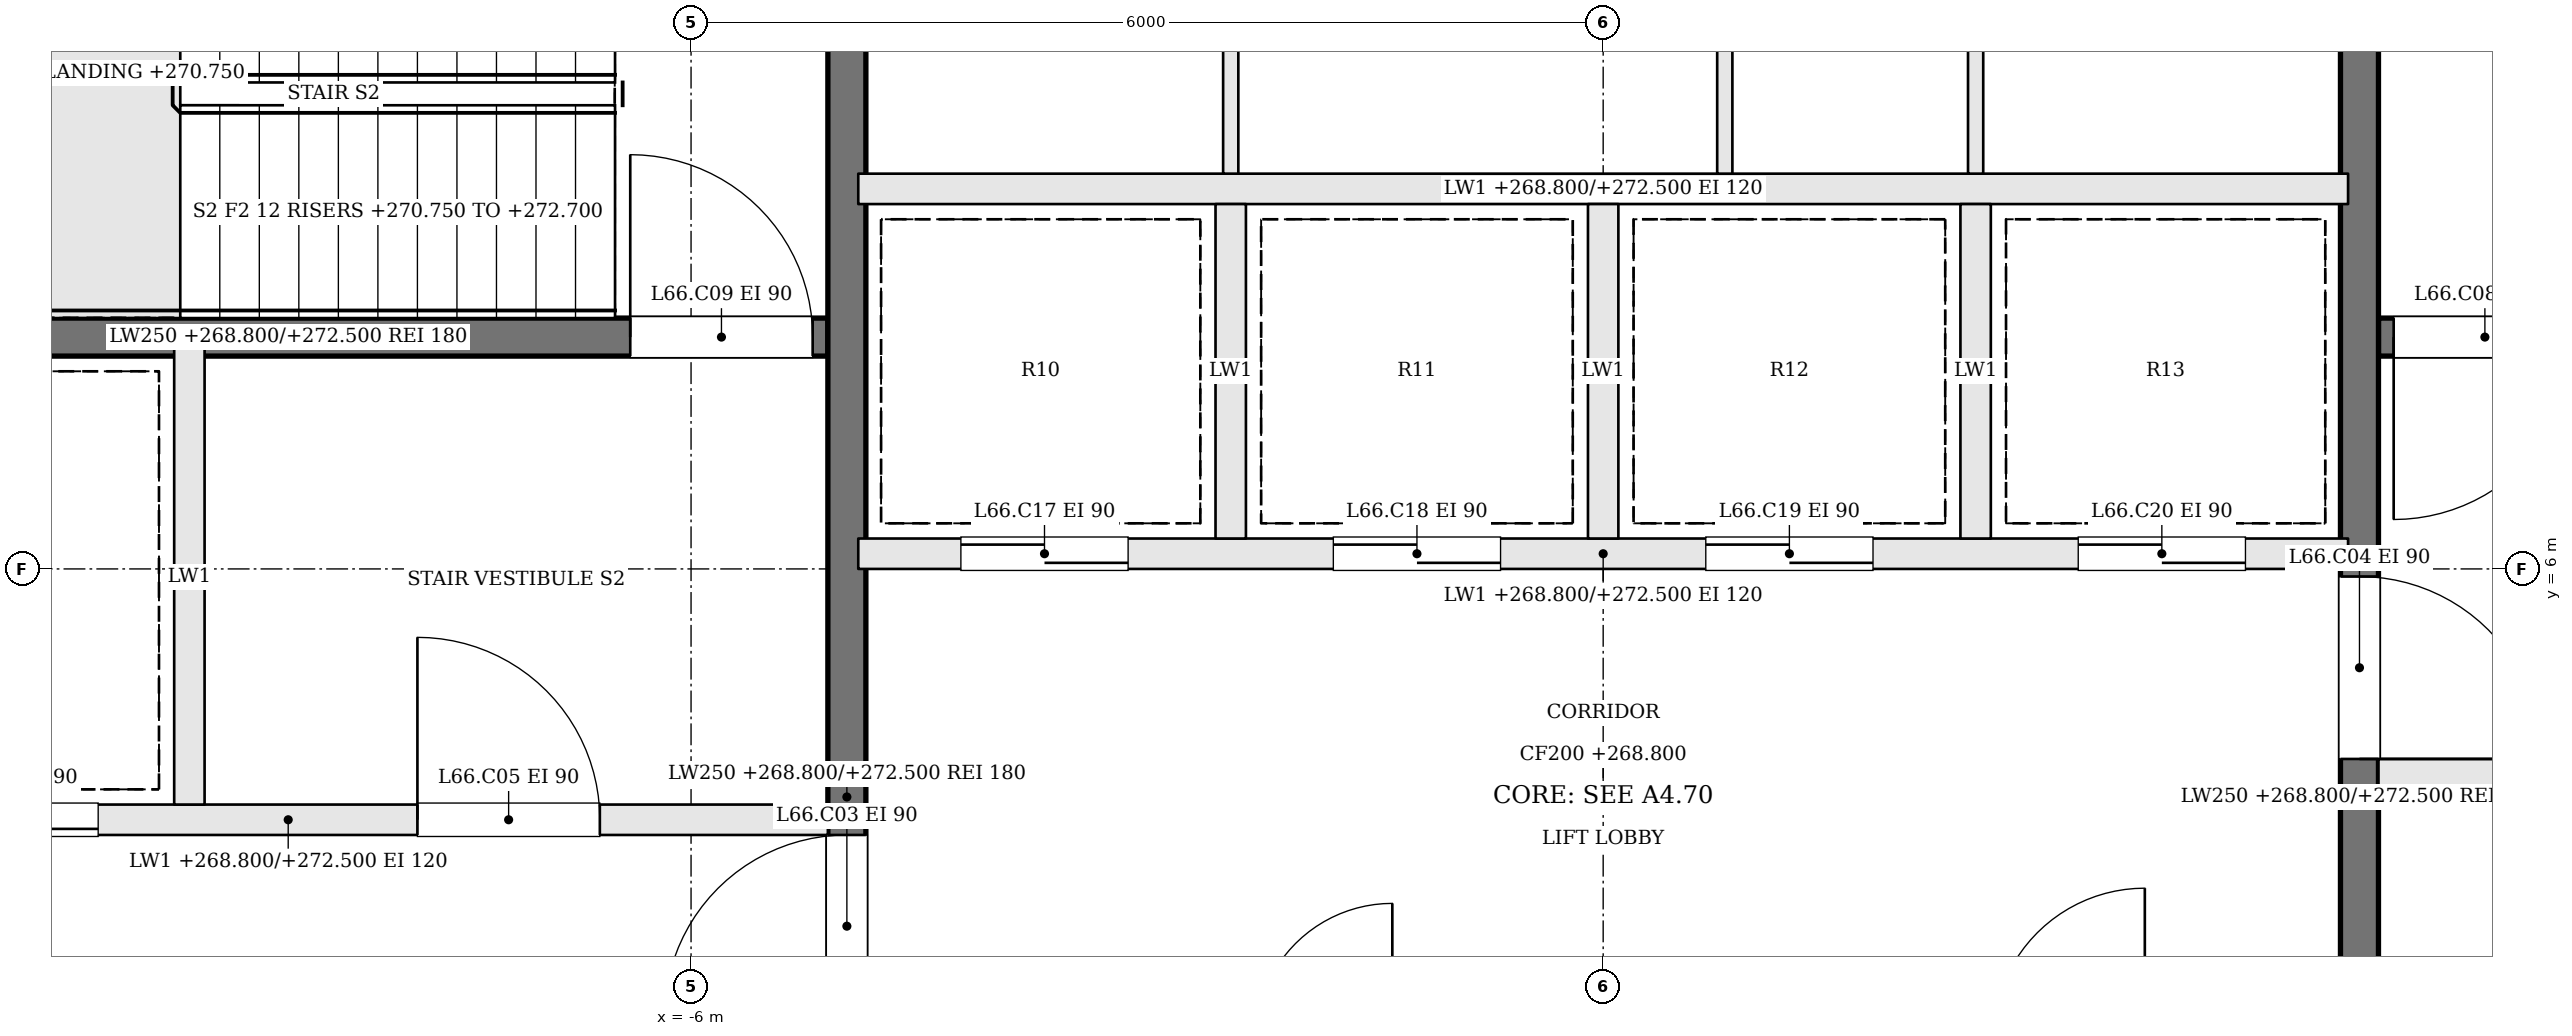
"""IFC4 building model, lengths in metres.
Left out: names, types, materials, properties, quantities, classifications, styles, units other than length and angle.
Written with IfcOpenShell. Run it as: python <this file> out.ifc"""

import sys

from ifc_helpers import new_model, si_unit, direction, frame, frame_2d, origin, place, context, subcontext, project, spatial, rectangle, extrude, element, fill, save


model = new_model("IFC4")
c1 = context("Model", 3, precision=1e-05, world=origin(), true_north=direction((0.0, 1.0)))
c2 = subcontext(c1, "Body", "Model", "MODEL_VIEW")
j1 = project(units=[si_unit("LENGTHUNIT", "METRE"), si_unit("PLANEANGLEUNIT", "RADIAN")], contexts=[c1])
p1 = place(None, origin())
s1 = spatial("IfcSite", under=j1, at=p1, CompositionType="ELEMENT")
p2 = place(p1, origin())
s2 = spatial("IfcBuilding", under=s1, at=p2, CompositionType="ELEMENT")
p3 = place(p2, frame((0.0, 0.0, 268.8)))
s3 = spatial("IfcBuildingStorey", under=s2, at=p3, CompositionType="ELEMENT", Elevation=268.8)
p4 = place(p3, frame((12.2, 7.525, 0.0), z_axis=(0.0, 0.0, 1.0), x_axis=(-1.0, 0.0, 0.0)))
e1 = element("IfcWall", 1, at=p4, inside=s3, PredefinedType="SOLIDWALL", context=c2, shape_type="SweptSolid", body=[
    extrude(rectangle(XDim=7.1, YDim=0.25, at=frame_2d((3.55, 0.0))), origin(), (0.0, 0.0, 1.0), 3.7),
])
p5 = place(p4, frame((5.8, 0.0, 0.0)))
e2 = element("IfcOpeningElement", 2, at=p5, cuts=e1, PredefinedType="OPENING", context=c2, shape_type="SweptSolid", body=[
    extrude(rectangle(XDim=1.2, YDim=2.1, at=frame_2d((0.6, 1.05))), frame((0.0, 0.135, 0.0), z_axis=(0.0, -1.0, 0.0), x_axis=(1.0, 0.0, 0.0)), (0.0, 0.0, 1.0), 0.27),
])
p6 = place(p3, frame((-12.2, 4.35, 0.0), z_axis=(0.0, 0.0, 1.0), x_axis=(1.0, 0.0, 0.0)))
e3 = element("IfcWall", 3, at=p6, inside=s3, PredefinedType="SOLIDWALL", context=c2, shape_type="SweptSolid", body=[
    extrude(rectangle(XDim=7.1, YDim=0.2, at=frame_2d((3.55, 0.0))), origin(), (0.0, 0.0, 1.0), 3.7),
])
p7 = place(p6, frame((4.4, 0.0, 0.0)))
e4 = element("IfcOpeningElement", 4, at=p7, cuts=e3, PredefinedType="OPENING", context=c2, shape_type="SweptSolid", body=[
    extrude(rectangle(XDim=1.2, YDim=2.1, at=frame_2d((0.6, 1.05))), frame((0.0, 0.11, 0.0), z_axis=(0.0, -1.0, 0.0), x_axis=(1.0, 0.0, 0.0)), (0.0, 0.0, 1.0), 0.22),
])
p8 = place(p6, frame((1.1, 0.0, 0.0)))
e5 = element("IfcOpeningElement", 5, at=p8, cuts=e3, PredefinedType="OPENING", context=c2, shape_type="SweptSolid", body=[
    extrude(rectangle(XDim=1.2, YDim=2.1, at=frame_2d((0.6, 1.05))), frame((0.0, 0.11, 0.0), z_axis=(0.0, -1.0, 0.0), x_axis=(1.0, 0.0, 0.0)), (0.0, 0.0, 1.0), 0.22),
])
p9 = place(p3, frame((12.2, 4.65, 0.0), z_axis=(0.0, 0.0, 1.0), x_axis=(-1.0, 0.0, 0.0)))
e6 = element("IfcWall", 6, at=p9, inside=s3, PredefinedType="SOLIDWALL", context=c2, shape_type="SweptSolid", body=[
    extrude(rectangle(XDim=7.1, YDim=0.2, at=frame_2d((3.55, 0.0))), origin(), (0.0, 0.0, 1.0), 3.7),
])
p10 = place(p9, frame((4.4, 0.0, 0.0)))
e7 = element("IfcOpeningElement", 7, at=p10, cuts=e6, PredefinedType="OPENING", context=c2, shape_type="SweptSolid", body=[
    extrude(rectangle(XDim=1.2, YDim=2.1, at=frame_2d((0.6, 1.05))), frame((0.0, 0.11, 0.0), z_axis=(0.0, -1.0, 0.0), x_axis=(1.0, 0.0, 0.0)), (0.0, 0.0, 1.0), 0.22),
])
p11 = place(p9, frame((1.1, 0.0, 0.0)))
e8 = element("IfcOpeningElement", 8, at=p11, cuts=e6, PredefinedType="OPENING", context=c2, shape_type="SweptSolid", body=[
    extrude(rectangle(XDim=1.2, YDim=2.1, at=frame_2d((0.6, 1.05))), frame((0.0, 0.11, 0.0), z_axis=(0.0, -1.0, 0.0), x_axis=(1.0, 0.0, 0.0)), (0.0, 0.0, 1.0), 0.22),
])
p12 = place(p3, frame((-12.2, 7.525, 0.0), z_axis=(0.0, 0.0, 1.0), x_axis=(1.0, 0.0, 0.0)))
e9 = element("IfcWall", 9, at=p12, inside=s3, PredefinedType="SOLIDWALL", context=c2, shape_type="SweptSolid", body=[
    extrude(rectangle(XDim=7.1, YDim=0.25, at=frame_2d((3.55, 0.0))), origin(), (0.0, 0.0, 1.0), 3.7),
])
p13 = place(p12, frame((5.8, 0.0, 0.0)))
e10 = element("IfcOpeningElement", 10, at=p13, cuts=e9, PredefinedType="OPENING", context=c2, shape_type="SweptSolid", body=[
    extrude(rectangle(XDim=1.2, YDim=2.1, at=frame_2d((0.6, 1.05))), frame((0.0, 0.135, 0.0), z_axis=(0.0, -1.0, 0.0), x_axis=(1.0, 0.0, 0.0)), (0.0, 0.0, 1.0), 0.27),
])
p14 = place(p3, frame((-9.3, 4.45, 0.0), z_axis=(0.0, 0.0, 1.0), x_axis=(0.0, 1.0, 0.0)))
e11 = element("IfcWall", 11, at=p14, inside=s3, PredefinedType="SOLIDWALL", context=c2, shape_type="SweptSolid", body=[
    extrude(rectangle(XDim=3.0, YDim=0.2, at=frame_2d((1.5, 0.0))), origin(), (0.0, 0.0, 1.0), 3.7),
])
p15 = place(p3, frame((-4.975, -2.2, 0.0), z_axis=(0.0, 0.0, 1.0), x_axis=(0.0, 1.0, 0.0)))
e12 = element("IfcWall", 12, at=p15, inside=s3, PredefinedType="SOLIDWALL", context=c2, shape_type="SweptSolid", body=[
    extrude(rectangle(XDim=13.4, YDim=0.25, at=frame_2d((6.7, 0.0))), origin(), (0.0, 0.0, 1.0), 3.7),
])
p16 = place(p15, frame((5.25, 0.0, 0.0)))
e13 = element("IfcOpeningElement", 13, at=p16, cuts=e12, PredefinedType="OPENING", context=c2, shape_type="SweptSolid", body=[
    extrude(rectangle(XDim=1.2, YDim=2.1, at=frame_2d((0.6, 1.05))), frame((0.0, 0.135, 0.0), z_axis=(0.0, -1.0, 0.0), x_axis=(1.0, 0.0, 0.0)), (0.0, 0.0, 1.0), 0.27),
])
p17 = place(p3, frame((4.975, 11.2, 0.0), z_axis=(0.0, 0.0, 1.0), x_axis=(0.0, -1.0, 0.0)))
e14 = element("IfcWall", 14, at=p17, inside=s3, PredefinedType="SOLIDWALL", context=c2, shape_type="SweptSolid", body=[
    extrude(rectangle(XDim=13.4, YDim=0.25, at=frame_2d((6.7, 0.0))), origin(), (0.0, 0.0, 1.0), 3.7),
])
p18 = place(p17, frame((5.25, 0.0, 0.0)))
e15 = element("IfcOpeningElement", 15, at=p18, cuts=e14, PredefinedType="OPENING", context=c2, shape_type="SweptSolid", body=[
    extrude(rectangle(XDim=1.2, YDim=2.1, at=frame_2d((0.6, 1.05))), frame((0.0, 0.135, 0.0), z_axis=(0.0, -1.0, 0.0), x_axis=(1.0, 0.0, 0.0)), (0.0, 0.0, 1.0), 0.27),
])
p19 = place(p3, frame((-4.9, 6.1, 0.0), z_axis=(0.0, 0.0, 1.0), x_axis=(1.0, 0.0, 0.0)))
e16 = element("IfcWall", 16, at=p19, inside=s3, PredefinedType="SOLIDWALL", context=c2, shape_type="SweptSolid", body=[
    extrude(rectangle(XDim=9.8, YDim=0.2, at=frame_2d((4.9, 0.0))), origin(), (0.0, 0.0, 1.0), 3.7),
])
p20 = place(p19, frame((0.675, 0.0, 0.0)))
e17 = element("IfcOpeningElement", 17, at=p20, cuts=e16, PredefinedType="OPENING", context=c2, shape_type="SweptSolid", body=[
    extrude(rectangle(XDim=1.1, YDim=2.1, at=frame_2d((0.55, 1.05))), frame((0.0, 0.11, 0.0), z_axis=(0.0, -1.0, 0.0), x_axis=(1.0, 0.0, 0.0)), (0.0, 0.0, 1.0), 0.22),
])
p21 = place(p19, frame((3.125, 0.0, 0.0)))
e18 = element("IfcOpeningElement", 18, at=p21, cuts=e16, PredefinedType="OPENING", context=c2, shape_type="SweptSolid", body=[
    extrude(rectangle(XDim=1.1, YDim=2.1, at=frame_2d((0.55, 1.05))), frame((0.0, 0.11, 0.0), z_axis=(0.0, -1.0, 0.0), x_axis=(1.0, 0.0, 0.0)), (0.0, 0.0, 1.0), 0.22),
])
p22 = place(p19, frame((5.575, 0.0, 0.0)))
e19 = element("IfcOpeningElement", 19, at=p22, cuts=e16, PredefinedType="OPENING", context=c2, shape_type="SweptSolid", body=[
    extrude(rectangle(XDim=1.1, YDim=2.1, at=frame_2d((0.55, 1.05))), frame((0.0, 0.11, 0.0), z_axis=(0.0, -1.0, 0.0), x_axis=(1.0, 0.0, 0.0)), (0.0, 0.0, 1.0), 0.22),
])
p23 = place(p19, frame((8.025, 0.0, 0.0)))
e20 = element("IfcOpeningElement", 20, at=p23, cuts=e16, PredefinedType="OPENING", context=c2, shape_type="SweptSolid", body=[
    extrude(rectangle(XDim=1.1, YDim=2.1, at=frame_2d((0.55, 1.05))), frame((0.0, 0.11, 0.0), z_axis=(0.0, -1.0, 0.0), x_axis=(1.0, 0.0, 0.0)), (0.0, 0.0, 1.0), 0.22),
])
p24 = place(p3, frame((-4.9, 8.5, 0.0), z_axis=(0.0, 0.0, 1.0), x_axis=(1.0, 0.0, 0.0)))
e21 = element("IfcWall", 21, at=p24, inside=s3, PredefinedType="SOLIDWALL", context=c2, shape_type="SweptSolid", body=[
    extrude(rectangle(XDim=9.8, YDim=0.2, at=frame_2d((4.9, 0.0))), origin(), (0.0, 0.0, 1.0), 3.7),
])
for number, where, z_axis, x_axis in (
    (22, (-2.45, 6.2, 0.0), (0.0, 0.0, 1.0), (0.0, 1.0, 0.0)),
    (23, (0.0, 6.2, 0.0), (0.0, 0.0, 1.0), (0.0, 1.0, 0.0)),
    (24, (2.45, 6.2, 0.0), (0.0, 0.0, 1.0), (0.0, 1.0, 0.0)),
):
    element("IfcWall", number, at=place(p3, frame(where, z_axis=z_axis, x_axis=x_axis)), inside=s3, PredefinedType="SOLIDWALL", context=c2, shape_type="SweptSolid", body=[
        extrude(rectangle(XDim=2.2, YDim=0.2, at=frame_2d((1.1, 0.0))), origin(), (0.0, 0.0, 1.0), 3.7),
    ])
for number, where, z_axis, x_axis in (
    (25, (-2.45, 8.6, 0.0), (0.0, 0.0, 1.0), (0.0, 1.0, 0.0)),
    (26, (0.8, 8.6, 0.0), (0.0, 0.0, 1.0), (0.0, 1.0, 0.0)),
    (27, (2.45, 8.6, 0.0), (0.0, 0.0, 1.0), (0.0, 1.0, 0.0)),
):
    element("IfcWall", number, at=place(p3, frame(where, z_axis=z_axis, x_axis=x_axis)), inside=s3, PredefinedType="PARTITIONING", context=c2, shape_type="SweptSolid", body=[
        extrude(rectangle(XDim=2.6, YDim=0.1, at=frame_2d((1.3, 0.0))), origin(), (0.0, 0.0, 1.0), 3.7),
    ])
p25 = place(p16, origin())
e28 = element("IfcDoor", 28, at=p25, inside=s3, OperationType="SINGLE_SWING_LEFT", PredefinedType="DOOR", context=c2, shape_type="SweptSolid", body=[
    extrude(rectangle(XDim=1.2, YDim=2.1, at=frame_2d((0.6, 1.05))), frame((0.0, 0.025, 0.0), z_axis=(0.0, -1.0, 0.0), x_axis=(1.0, 0.0, 0.0)), (0.0, 0.0, 1.0), 0.05),
])
fill(e13, e28)
p26 = place(p18, origin())
e29 = element("IfcDoor", 29, at=p26, inside=s3, OperationType="SINGLE_SWING_RIGHT", PredefinedType="DOOR", context=c2, shape_type="SweptSolid", body=[
    extrude(rectangle(XDim=1.2, YDim=2.1, at=frame_2d((0.6, 1.05))), frame((0.0, 0.025, 0.0), z_axis=(0.0, -1.0, 0.0), x_axis=(1.0, 0.0, 0.0)), (0.0, 0.0, 1.0), 0.05),
])
fill(e15, e29)
p27 = place(p7, origin())
e30 = element("IfcDoor", 30, at=p27, inside=s3, OperationType="SINGLE_SWING_LEFT", PredefinedType="DOOR", context=c2, shape_type="SweptSolid", body=[
    extrude(rectangle(XDim=1.2, YDim=2.1, at=frame_2d((0.6, 1.05))), frame((0.0, 0.025, 0.0), z_axis=(0.0, -1.0, 0.0), x_axis=(1.0, 0.0, 0.0)), (0.0, 0.0, 1.0), 0.05),
])
fill(e4, e30)
p28 = place(p5, origin())
e31 = element("IfcDoor", 31, at=p28, inside=s3, OperationType="SINGLE_SWING_RIGHT", PredefinedType="DOOR", context=c2, shape_type="SweptSolid", body=[
    extrude(rectangle(XDim=1.2, YDim=2.1, at=frame_2d((0.6, 1.05))), frame((0.0, 0.025, 0.0), z_axis=(0.0, -1.0, 0.0), x_axis=(1.0, 0.0, 0.0)), (0.0, 0.0, 1.0), 0.05),
])
fill(e2, e31)
p29 = place(p13, origin())
e32 = element("IfcDoor", 32, at=p29, inside=s3, OperationType="SINGLE_SWING_LEFT", PredefinedType="DOOR", context=c2, shape_type="SweptSolid", body=[
    extrude(rectangle(XDim=1.2, YDim=2.1, at=frame_2d((0.6, 1.05))), frame((0.0, 0.025, 0.0), z_axis=(0.0, -1.0, 0.0), x_axis=(1.0, 0.0, 0.0)), (0.0, 0.0, 1.0), 0.05),
])
fill(e10, e32)
p30 = place(p8, origin())
e33 = element("IfcDoor", 33, at=p30, inside=s3, OperationType="SLIDING_TO_RIGHT", PredefinedType="DOOR", context=c2, shape_type="SweptSolid", body=[
    extrude(rectangle(XDim=1.2, YDim=2.1, at=frame_2d((0.6, 1.05))), frame((0.0, 0.025, 0.0), z_axis=(0.0, -1.0, 0.0), x_axis=(1.0, 0.0, 0.0)), (0.0, 0.0, 1.0), 0.05),
])
fill(e5, e33)
p31 = place(p20, origin())
e34 = element("IfcDoor", 34, at=p31, inside=s3, OperationType="SLIDING_TO_RIGHT", PredefinedType="DOOR", context=c2, shape_type="SweptSolid", body=[
    extrude(rectangle(XDim=1.1, YDim=2.1, at=frame_2d((0.55, 1.05))), frame((0.0, 0.025, 0.0), z_axis=(0.0, -1.0, 0.0), x_axis=(1.0, 0.0, 0.0)), (0.0, 0.0, 1.0), 0.05),
])
fill(e17, e34)
p32 = place(p21, origin())
e35 = element("IfcDoor", 35, at=p32, inside=s3, OperationType="SLIDING_TO_LEFT", PredefinedType="DOOR", context=c2, shape_type="SweptSolid", body=[
    extrude(rectangle(XDim=1.1, YDim=2.1, at=frame_2d((0.55, 1.05))), frame((0.0, 0.025, 0.0), z_axis=(0.0, -1.0, 0.0), x_axis=(1.0, 0.0, 0.0)), (0.0, 0.0, 1.0), 0.05),
])
fill(e18, e35)
p33 = place(p22, origin())
e36 = element("IfcDoor", 36, at=p33, inside=s3, OperationType="SLIDING_TO_RIGHT", PredefinedType="DOOR", context=c2, shape_type="SweptSolid", body=[
    extrude(rectangle(XDim=1.1, YDim=2.1, at=frame_2d((0.55, 1.05))), frame((0.0, 0.025, 0.0), z_axis=(0.0, -1.0, 0.0), x_axis=(1.0, 0.0, 0.0)), (0.0, 0.0, 1.0), 0.05),
])
fill(e19, e36)
p34 = place(p23, origin())
e37 = element("IfcDoor", 37, at=p34, inside=s3, OperationType="SLIDING_TO_LEFT", PredefinedType="DOOR", context=c2, shape_type="SweptSolid", body=[
    extrude(rectangle(XDim=1.1, YDim=2.1, at=frame_2d((0.55, 1.05))), frame((0.0, 0.025, 0.0), z_axis=(0.0, -1.0, 0.0), x_axis=(1.0, 0.0, 0.0)), (0.0, 0.0, 1.0), 0.05),
])
fill(e20, e37)
save(model, sys.argv[1])
